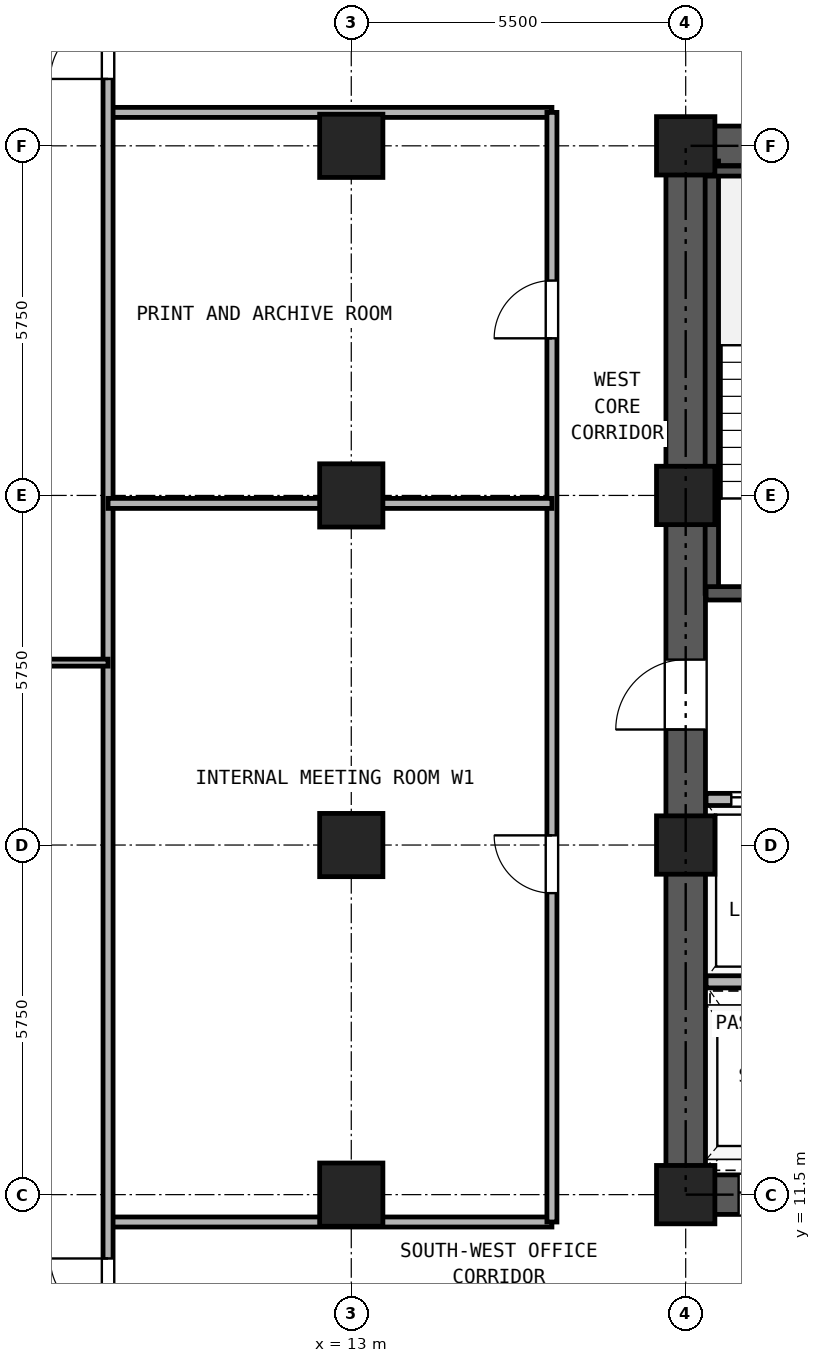
"""IFC4 building model, lengths in metres.
Left out: names, types, materials, properties, quantities, classifications, styles, units other than length and angle.
Written with IfcOpenShell. Run it as: python <this file> out.ifc"""

import sys

from ifc_helpers import new_model, si_unit, direction, frame, frame_2d, origin, origin_2d, place, context, subcontext, project, spatial, rectangle, hollow_rectangle, extrude, source, transform, mapped, element, fill, save


model = new_model("IFC4")
c1 = context("Model", 3, precision=1e-05, world=origin(), true_north=direction((0.0, 1.0)))
c2 = subcontext(c1, "Body", "Model", "MODEL_VIEW")
j1 = project(units=[si_unit("LENGTHUNIT", "METRE"), si_unit("PLANEANGLEUNIT", "RADIAN")], contexts=[c1])
p1 = place(None, origin())
s1 = spatial("IfcSite", under=j1, at=p1, CompositionType="ELEMENT")
p2 = place(p1, origin())
s2 = spatial("IfcBuilding", under=s1, at=p2, CompositionType="ELEMENT")
p3 = place(p2, frame((0.0, 0.0, 54.9)))
s3 = spatial("IfcBuildingStorey", under=s2, at=p3, CompositionType="ELEMENT", Elevation=54.9)
m1 = source(origin(), c2, "Body", "SweptSolid", [
    extrude(hollow_rectangle(XDim=1.04, YDim=1.04, WallThickness=0.065, at=origin_2d()), origin(), (0.0, 0.0, 1.0), 3.32),
])
for number, where, z_axis, x_axis in (
    (1, (13.0, 11.5, 0.0), (0.0, 0.0, 1.0), (1.0, 0.0, 0.0)),
    (2, (13.0, 17.25, 0.0), (0.0, 0.0, 1.0), (1.0, 0.0, 0.0)),
    (3, (13.0, 23.0, 0.0), (0.0, 0.0, 1.0), (1.0, 0.0, 0.0)),
    (4, (13.0, 28.75, 0.0), (0.0, 0.0, 1.0), (1.0, 0.0, 0.0)),
):
    element("IfcColumn", number, at=place(p3, frame(where, z_axis=z_axis, x_axis=x_axis)), inside=s3, PredefinedType="COLUMN", context=c2, shape_type="MappedRepresentation", body=[
        mapped(m1, transform((0.0, 0.0, 0.0), x_axis=(1.0, 0.0, 0.0), y_axis=(0.0, 1.0, 0.0), z_axis=(0.0, 0.0, 1.0), scale=1.0)),
    ])
m2 = source(origin(), c2, "Body", "SweptSolid", [
    extrude(hollow_rectangle(XDim=0.96, YDim=0.96, WallThickness=0.06, at=origin_2d()), origin(), (0.0, 0.0, 1.0), 3.32),
])
for number, where, z_axis, x_axis in (
    (5, (18.5, 11.5, 0.0), (0.0, 0.0, 1.0), (1.0, 0.0, 0.0)),
    (6, (18.5, 17.25, 0.0), (0.0, 0.0, 1.0), (1.0, 0.0, 0.0)),
    (7, (18.5, 23.0, 0.0), (0.0, 0.0, 1.0), (1.0, 0.0, 0.0)),
    (8, (18.5, 28.75, 0.0), (0.0, 0.0, 1.0), (1.0, 0.0, 0.0)),
):
    element("IfcColumn", number, at=place(p3, frame(where, z_axis=z_axis, x_axis=x_axis)), inside=s3, PredefinedType="COLUMN", context=c2, shape_type="MappedRepresentation", body=[
        mapped(m2, transform((0.0, 0.0, 0.0), x_axis=(1.0, 0.0, 0.0), y_axis=(0.0, 1.0, 0.0), z_axis=(0.0, 0.0, 1.0), scale=1.0)),
    ])
p4 = place(p3, frame((18.175, 11.5, 0.0), z_axis=(0.0, 0.0, 1.0), x_axis=(1.0, 0.0, 0.0)))
e9 = element("IfcWall", 9, at=p4, inside=s3, PredefinedType="SHEAR", context=c2, shape_type="SweptSolid", body=[
    extrude(rectangle(XDim=10.65, YDim=0.65, at=frame_2d((5.325, 0.0))), origin(), (0.0, 0.0, 1.0), 3.32),
])
p5 = place(p4, frame((1.195, 0.0, 0.0)))
e10 = element("IfcOpeningElement", 10, at=p5, cuts=e9, PredefinedType="OPENING", context=c2, shape_type="SweptSolid", body=[
    extrude(rectangle(XDim=1.1, YDim=2.25, at=frame_2d((0.55, 1.125))), frame((0.0, 0.335, 0.0), z_axis=(0.0, -1.0, 0.0), x_axis=(1.0, 0.0, 0.0)), (0.0, 0.0, 1.0), 0.67),
])
p6 = place(p4, frame((3.495, 0.0, 0.0)))
e11 = element("IfcOpeningElement", 11, at=p6, cuts=e9, PredefinedType="OPENING", context=c2, shape_type="SweptSolid", body=[
    extrude(rectangle(XDim=1.1, YDim=2.25, at=frame_2d((0.55, 1.125))), frame((0.0, 0.335, 0.0), z_axis=(0.0, -1.0, 0.0), x_axis=(1.0, 0.0, 0.0)), (0.0, 0.0, 1.0), 0.67),
])
p7 = place(p4, frame((5.925, 0.0, 0.0)))
e12 = element("IfcOpeningElement", 12, at=p7, cuts=e9, PredefinedType="OPENING", context=c2, shape_type="SweptSolid", body=[
    extrude(rectangle(XDim=1.1, YDim=2.25, at=frame_2d((0.55, 1.125))), frame((0.0, 0.335, 0.0), z_axis=(0.0, -1.0, 0.0), x_axis=(1.0, 0.0, 0.0)), (0.0, 0.0, 1.0), 0.67),
])
p8 = place(p4, frame((8.325, 0.0, 0.0)))
e13 = element("IfcOpeningElement", 13, at=p8, cuts=e9, PredefinedType="OPENING", context=c2, shape_type="SweptSolid", body=[
    extrude(rectangle(XDim=1.1, YDim=2.25, at=frame_2d((0.55, 1.125))), frame((0.0, 0.335, 0.0), z_axis=(0.0, -1.0, 0.0), x_axis=(1.0, 0.0, 0.0)), (0.0, 0.0, 1.0), 0.67),
])
p9 = place(p3, frame((18.175, 28.75, 0.0), z_axis=(0.0, 0.0, 1.0), x_axis=(1.0, 0.0, 0.0)))
e14 = element("IfcWall", 14, at=p9, inside=s3, PredefinedType="SHEAR", context=c2, shape_type="SweptSolid", body=[
    extrude(rectangle(XDim=10.65, YDim=0.65, at=frame_2d((5.325, 0.0))), origin(), (0.0, 0.0, 1.0), 3.32),
])
p10 = place(p9, frame((4.205, 0.0, 0.0)))
e15 = element("IfcOpeningElement", 15, at=p10, cuts=e14, PredefinedType="OPENING", context=c2, shape_type="SweptSolid", body=[
    extrude(rectangle(XDim=0.9, YDim=2.05, at=frame_2d((0.45, 1.025))), frame((0.0, 0.335, 0.0), z_axis=(0.0, -1.0, 0.0), x_axis=(1.0, 0.0, 0.0)), (0.0, 0.0, 1.0), 0.67),
])
p11 = place(p9, frame((5.745, 0.0, 0.0)))
e16 = element("IfcOpeningElement", 16, at=p11, cuts=e14, PredefinedType="OPENING", context=c2, shape_type="SweptSolid", body=[
    extrude(rectangle(XDim=0.9, YDim=2.05, at=frame_2d((0.45, 1.025))), frame((0.0, 0.335, 0.0), z_axis=(0.0, -1.0, 0.0), x_axis=(1.0, 0.0, 0.0)), (0.0, 0.0, 1.0), 0.67),
])
p12 = place(p3, frame((18.5, 11.825, 0.0), z_axis=(0.0, 0.0, 1.0), x_axis=(0.0, 1.0, 0.0)))
e17 = element("IfcWall", 17, at=p12, inside=s3, PredefinedType="SHEAR", context=c2, shape_type="SweptSolid", body=[
    extrude(rectangle(XDim=16.6, YDim=0.65, at=frame_2d((8.3, 0.0))), origin(), (0.0, 0.0, 1.0), 3.32),
])
p13 = place(p12, frame((7.325, 0.0, 0.0)))
e18 = element("IfcOpeningElement", 18, at=p13, cuts=e17, PredefinedType="OPENING", context=c2, shape_type="SweptSolid", body=[
    extrude(rectangle(XDim=1.15, YDim=2.2, at=frame_2d((0.575, 1.1))), frame((0.0, 0.335, 0.0), z_axis=(0.0, -1.0, 0.0), x_axis=(1.0, 0.0, 0.0)), (0.0, 0.0, 1.0), 0.67),
])
p14 = place(p3, frame((18.93, 21.39, 0.0), z_axis=(0.0, 0.0, 1.0), x_axis=(0.0, 1.0, 0.0)))
e19 = element("IfcWall", 19, at=p14, inside=s3, PredefinedType="SOLIDWALL", context=c2, shape_type="SweptSolid", body=[
    extrude(rectangle(XDim=7.11, YDim=0.22, at=frame_2d((3.555, 0.0))), origin(), (0.0, 0.0, 1.0), 3.32),
])
p15 = place(p3, frame((18.835, 28.335, 0.0), z_axis=(0.0, 0.0, 1.0), x_axis=(1.0, 0.0, 0.0)))
e20 = element("IfcWall", 20, at=p15, inside=s3, PredefinedType="PARTITIONING", context=c2, shape_type="SweptSolid", body=[
    extrude(rectangle(XDim=3.275, YDim=0.165, at=frame_2d((1.638, 0.0))), origin(), (0.0, 0.0, 1.0), 3.32),
])
p16 = place(p3, frame((18.835, 21.39, 0.0), z_axis=(0.0, 0.0, 1.0), x_axis=(1.0, 0.0, 0.0)))
e21 = element("IfcWall", 21, at=p16, inside=s3, PredefinedType="SOLIDWALL", context=c2, shape_type="SweptSolid", body=[
    extrude(rectangle(XDim=6.295, YDim=0.22, at=frame_2d((3.147, 0.0))), origin(), (0.0, 0.0, 1.0), 3.32),
])
p17 = place(p16, frame((1.015, 0.0, 0.0)))
e22 = element("IfcOpeningElement", 22, at=p17, cuts=e21, PredefinedType="OPENING", context=c2, shape_type="SweptSolid", body=[
    extrude(rectangle(XDim=1.15, YDim=2.2, at=frame_2d((0.575, 1.1))), frame((0.0, 0.12, 0.0), z_axis=(0.0, -1.0, 0.0), x_axis=(1.0, 0.0, 0.0)), (0.0, 0.0, 1.0), 0.24),
])
p18 = place(p16, frame((4.745, 0.0, 0.0)))
e23 = element("IfcOpeningElement", 23, at=p18, cuts=e21, PredefinedType="OPENING", context=c2, shape_type="SweptSolid", body=[
    extrude(rectangle(XDim=1.1, YDim=2.25, at=frame_2d((0.55, 1.125))), frame((0.0, 0.12, 0.0), z_axis=(0.0, -1.0, 0.0), x_axis=(1.0, 0.0, 0.0)), (0.0, 0.0, 1.0), 0.24),
])
p19 = place(p3, frame((18.835, 18.0, 0.0), z_axis=(0.0, 0.0, 1.0), x_axis=(1.0, 0.0, 0.0)))
e24 = element("IfcWall", 24, at=p19, inside=s3, PredefinedType="PARTITIONING", context=c2, shape_type="SweptSolid", body=[
    extrude(rectangle(XDim=9.33, YDim=0.2, at=frame_2d((4.665, 0.0))), origin(), (0.0, 0.0, 1.0), 3.32),
])
p20 = place(p19, frame((0.415, 0.0, 0.0)))
e25 = element("IfcOpeningElement", 25, at=p20, cuts=e24, PredefinedType="OPENING", context=c2, shape_type="SweptSolid", body=[
    extrude(rectangle(XDim=1.3, YDim=2.3, at=frame_2d((0.65, 1.15))), frame((0.0, 0.11, 0.0), z_axis=(0.0, -1.0, 0.0), x_axis=(1.0, 0.0, 0.0)), (0.0, 0.0, 1.0), 0.22),
])
p21 = place(p19, frame((2.515, 0.0, 0.0)))
e26 = element("IfcOpeningElement", 26, at=p21, cuts=e24, PredefinedType="OPENING", context=c2, shape_type="SweptSolid", body=[
    extrude(rectangle(XDim=1.3, YDim=2.3, at=frame_2d((0.65, 1.15))), frame((0.0, 0.11, 0.0), z_axis=(0.0, -1.0, 0.0), x_axis=(1.0, 0.0, 0.0)), (0.0, 0.0, 1.0), 0.22),
])
p22 = place(p19, frame((7.015, 0.0, 0.0)))
e27 = element("IfcOpeningElement", 27, at=p22, cuts=e24, PredefinedType="OPENING", context=c2, shape_type="SweptSolid", body=[
    extrude(rectangle(XDim=1.0, YDim=2.15, at=frame_2d((0.5, 1.075))), frame((0.0, 0.11, 0.0), z_axis=(0.0, -1.0, 0.0), x_axis=(1.0, 0.0, 0.0)), (0.0, 0.0, 1.0), 0.22),
])
p23 = place(p3, frame((18.835, 15.0, 0.0), z_axis=(0.0, 0.0, 1.0), x_axis=(1.0, 0.0, 0.0)))
e28 = element("IfcWall", 28, at=p23, inside=s3, PredefinedType="PARTITIONING", context=c2, shape_type="SweptSolid", body=[
    extrude(rectangle(XDim=9.33, YDim=0.2, at=frame_2d((4.665, 0.0))), origin(), (0.0, 0.0, 1.0), 3.32),
])
for number, where, z_axis, x_axis in (
    (29, (9.0, 11.05, 0.0), (0.0, 0.0, 1.0), (1.0, 0.0, 0.0)),
    (30, (9.0, 29.3, 0.0), (0.0, 0.0, 1.0), (1.0, 0.0, 0.0)),
):
    element("IfcWall", number, at=place(p3, frame(where, z_axis=z_axis, x_axis=x_axis)), inside=s3, PredefinedType="PARTITIONING", context=c2, shape_type="SweptSolid", body=[
        extrude(rectangle(XDim=7.3, YDim=0.165, at=frame_2d((3.65, 0.0))), origin(), (0.0, 0.0, 1.0), 3.32),
    ])
p24 = place(p3, frame((16.3, 11.05, 0.0), z_axis=(0.0, 0.0, 1.0), x_axis=(0.0, 1.0, 0.0)))
e31 = element("IfcWall", 31, at=p24, inside=s3, PredefinedType="PARTITIONING", context=c2, shape_type="SweptSolid", body=[
    extrude(rectangle(XDim=18.25, YDim=0.165, at=frame_2d((9.125, 0.0))), origin(), (0.0, 0.0, 1.0), 3.32),
])
p25 = place(p24, frame((5.409, 0.0, 0.0)))
e32 = element("IfcOpeningElement", 32, at=p25, cuts=e31, PredefinedType="OPENING", context=c2, shape_type="SweptSolid", body=[
    extrude(rectangle(XDim=0.95, YDim=2.15, at=frame_2d((0.475, 1.075))), frame((0.0, 0.093, 0.0), z_axis=(0.0, -1.0, 0.0), x_axis=(1.0, 0.0, 0.0)), (0.0, 0.0, 1.0), 0.185),
])
p26 = place(p24, frame((14.534, 0.0, 0.0)))
e33 = element("IfcOpeningElement", 33, at=p26, cuts=e31, PredefinedType="OPENING", context=c2, shape_type="SweptSolid", body=[
    extrude(rectangle(XDim=0.95, YDim=2.15, at=frame_2d((0.475, 1.075))), frame((0.0, 0.093, 0.0), z_axis=(0.0, -1.0, 0.0), x_axis=(1.0, 0.0, 0.0)), (0.0, 0.0, 1.0), 0.185),
])
p27 = place(p3, frame((9.0, 0.16, 0.0), z_axis=(0.0, 0.0, 1.0), x_axis=(0.0, 1.0, 0.0)))
e34 = element("IfcWall", 34, at=p27, inside=s3, PredefinedType="PARTITIONING", context=c2, shape_type="SweptSolid", body=[
    extrude(rectangle(XDim=40.18, YDim=0.165, at=frame_2d((20.09, 0.0))), origin(), (0.0, 0.0, 1.0), 3.32),
])
p28 = place(p27, frame((9.34, 0.0, 0.0)))
e35 = element("IfcOpeningElement", 35, at=p28, cuts=e34, PredefinedType="OPENING", context=c2, shape_type="SweptSolid", body=[
    extrude(rectangle(XDim=0.95, YDim=2.15, at=frame_2d((0.475, 1.075))), frame((0.0, 0.093, 0.0), z_axis=(0.0, -1.0, 0.0), x_axis=(1.0, 0.0, 0.0)), (0.0, 0.0, 1.0), 0.185),
])
p29 = place(p27, frame((29.69, 0.0, 0.0)))
e36 = element("IfcOpeningElement", 36, at=p29, cuts=e34, PredefinedType="OPENING", context=c2, shape_type="SweptSolid", body=[
    extrude(rectangle(XDim=0.95, YDim=2.15, at=frame_2d((0.475, 1.075))), frame((0.0, 0.093, 0.0), z_axis=(0.0, -1.0, 0.0), x_axis=(1.0, 0.0, 0.0)), (0.0, 0.0, 1.0), 0.185),
])
p30 = place(p3, frame((0.16, 20.25, 0.0), z_axis=(0.0, 0.0, 1.0), x_axis=(1.0, 0.0, 0.0)))
e37 = element("IfcWall", 37, at=p30, inside=s3, PredefinedType="PARTITIONING", context=c2, shape_type="SweptSolid", body=[
    extrude(rectangle(XDim=8.84, YDim=0.115, at=frame_2d((4.42, 0.0))), origin(), (0.0, 0.0, 1.0), 2.898),
])
p31 = place(p3, frame((9.0, 22.869, 0.0), z_axis=(0.0, 0.0, 1.0), x_axis=(1.0, 0.0, 0.0)))
e38 = element("IfcWall", 38, at=p31, inside=s3, PredefinedType="PARTITIONING", context=c2, shape_type="SweptSolid", body=[
    extrude(rectangle(XDim=7.3, YDim=0.165, at=frame_2d((3.65, 0.0))), origin(), (0.0, 0.0, 1.0), 2.539),
])
p32 = place(p20, origin())
e39 = element("IfcDoor", 39, at=p32, inside=s3, OperationType="DOUBLE_DOOR_SLIDING", PredefinedType="DOOR", context=c2, shape_type="SweptSolid", body=[
    extrude(rectangle(XDim=1.3, YDim=2.3, at=frame_2d((0.65, 1.15))), frame((0.0, 0.025, 0.0), z_axis=(0.0, -1.0, 0.0), x_axis=(1.0, 0.0, 0.0)), (0.0, 0.0, 1.0), 0.05),
])
fill(e25, e39)
p33 = place(p13, frame((1.15, 0.0, 0.0), z_axis=(0.0, 0.0, 1.0), x_axis=(-1.0, 0.0, 0.0)))
e40 = element("IfcDoor", 40, at=p33, inside=s3, OperationType="SINGLE_SWING_LEFT", PredefinedType="DOOR", context=c2, shape_type="SweptSolid", body=[
    extrude(rectangle(XDim=1.15, YDim=2.2, at=frame_2d((0.575, 1.1))), frame((0.0, 0.025, 0.0), z_axis=(0.0, -1.0, 0.0), x_axis=(1.0, 0.0, 0.0)), (0.0, 0.0, 1.0), 0.05),
])
fill(e18, e40)
p34 = place(p5, frame((1.1, 0.0, 0.0), z_axis=(0.0, 0.0, 1.0), x_axis=(-1.0, 0.0, 0.0)))
e41 = element("IfcDoor", 41, at=p34, inside=s3, OperationType="DOUBLE_DOOR_SLIDING", PredefinedType="DOOR", context=c2, shape_type="SweptSolid", body=[
    extrude(rectangle(XDim=1.1, YDim=2.25, at=frame_2d((0.55, 1.125))), frame((0.0, 0.025, 0.0), z_axis=(0.0, -1.0, 0.0), x_axis=(1.0, 0.0, 0.0)), (0.0, 0.0, 1.0), 0.05),
])
fill(e10, e41)
p35 = place(p28, frame((0.95, 0.0, 0.0), z_axis=(0.0, 0.0, 1.0), x_axis=(-1.0, 0.0, 0.0)))
e42 = element("IfcDoor", 42, at=p35, inside=s3, OperationType="SINGLE_SWING_RIGHT", PredefinedType="DOOR", context=c2, shape_type="SweptSolid", body=[
    extrude(rectangle(XDim=0.95, YDim=2.15, at=frame_2d((0.475, 1.075))), frame((0.0, 0.025, 0.0), z_axis=(0.0, -1.0, 0.0), x_axis=(1.0, 0.0, 0.0)), (0.0, 0.0, 1.0), 0.05),
])
fill(e35, e42)
p36 = place(p29, frame((0.95, 0.0, 0.0), z_axis=(0.0, 0.0, 1.0), x_axis=(-1.0, 0.0, 0.0)))
e43 = element("IfcDoor", 43, at=p36, inside=s3, OperationType="SINGLE_SWING_LEFT", PredefinedType="DOOR", context=c2, shape_type="SweptSolid", body=[
    extrude(rectangle(XDim=0.95, YDim=2.15, at=frame_2d((0.475, 1.075))), frame((0.0, 0.025, 0.0), z_axis=(0.0, -1.0, 0.0), x_axis=(1.0, 0.0, 0.0)), (0.0, 0.0, 1.0), 0.05),
])
fill(e36, e43)
p37 = place(p25, frame((0.95, 0.0, 0.0), z_axis=(0.0, 0.0, 1.0), x_axis=(-1.0, 0.0, 0.0)))
e44 = element("IfcDoor", 44, at=p37, inside=s3, OperationType="SINGLE_SWING_RIGHT", PredefinedType="DOOR", context=c2, shape_type="SweptSolid", body=[
    extrude(rectangle(XDim=0.95, YDim=2.15, at=frame_2d((0.475, 1.075))), frame((0.0, 0.025, 0.0), z_axis=(0.0, -1.0, 0.0), x_axis=(1.0, 0.0, 0.0)), (0.0, 0.0, 1.0), 0.05),
])
fill(e32, e44)
p38 = place(p26, frame((0.95, 0.0, 0.0), z_axis=(0.0, 0.0, 1.0), x_axis=(-1.0, 0.0, 0.0)))
e45 = element("IfcDoor", 45, at=p38, inside=s3, OperationType="SINGLE_SWING_LEFT", PredefinedType="DOOR", context=c2, shape_type="SweptSolid", body=[
    extrude(rectangle(XDim=0.95, YDim=2.15, at=frame_2d((0.475, 1.075))), frame((0.0, 0.025, 0.0), z_axis=(0.0, -1.0, 0.0), x_axis=(1.0, 0.0, 0.0)), (0.0, 0.0, 1.0), 0.05),
])
fill(e33, e45)
save(model, sys.argv[1])
